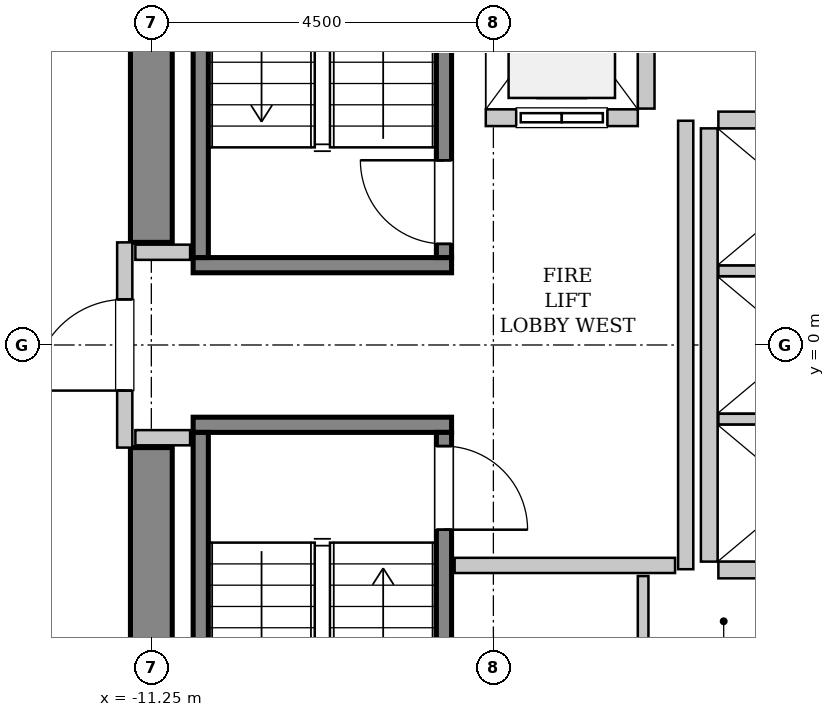
"""IFC4 building model, lengths in metres.
Left out: names, types, materials, properties, quantities, classifications, styles, units other than length and angle.
Written with IfcOpenShell. Run it as: python <this file> out.ifc"""

import sys

from ifc_helpers import new_model, si_unit, direction, frame, frame_2d, origin, place, context, subcontext, project, spatial, rectangle, extrude, source, transform, mapped, element, fill, save


model = new_model("IFC4")
c1 = context("Model", 3, precision=1e-05, world=origin(), true_north=direction((0.0, 1.0)))
c2 = subcontext(c1, "Body", "Model", "MODEL_VIEW")
j1 = project(units=[si_unit("LENGTHUNIT", "METRE"), si_unit("PLANEANGLEUNIT", "RADIAN")], contexts=[c1])
p1 = place(None, origin())
s1 = spatial("IfcSite", under=j1, at=p1, CompositionType="ELEMENT")
p2 = place(p1, origin())
s2 = spatial("IfcBuilding", under=s1, at=p2, CompositionType="ELEMENT")
p3 = place(p2, frame((0.0, 0.0, 164.0)))
s3 = spatial("IfcBuildingStorey", under=s2, at=p3, CompositionType="ELEMENT", Elevation=164.0)
m1 = source(origin(), c2, "Body", "SweptSolid", [
    extrude(rectangle(XDim=7.375, YDim=0.55, at=frame_2d((3.688, 0.0))), origin(), (0.0, 0.0, 1.0), 3.8),
])
for number, where, z_axis, x_axis in (
    (1, (-11.25, -8.725, 0.0), (0.0, 0.0, 1.0), (0.0, 1.0, 0.0)),
    (2, (-11.25, 1.35, 0.0), (0.0, 0.0, 1.0), (0.0, 1.0, 0.0)),
):
    element("IfcWall", number, at=place(p3, frame(where, z_axis=z_axis, x_axis=x_axis)), inside=s3, PredefinedType="SHEAR", context=c2, shape_type="MappedRepresentation", body=[
        mapped(m1, transform((0.0, 0.0, 0.0), x_axis=(1.0, 0.0, 0.0), y_axis=(0.0, 1.0, 0.0), z_axis=(0.0, 0.0, 1.0), scale=1.0)),
    ])
m2 = source(origin(), c2, "Body", "SweptSolid", [
    extrude(rectangle(XDim=3.4, YDim=0.2, at=frame_2d((1.7, 0.0))), origin(), (0.0, 0.0, 1.0), 3.8),
])
p4 = place(p3, frame((-7.3, 1.05, 0.0), z_axis=(0.0, 0.0, 1.0), x_axis=(-1.0, 0.0, 0.0)))
e3 = element("IfcWall", 3, at=p4, inside=s3, PredefinedType="SOLIDWALL", context=c2, shape_type="MappedRepresentation", body=[
    mapped(m2, transform((0.0, 0.0, 0.0), x_axis=(1.0, 0.0, 0.0), y_axis=(0.0, 1.0, 0.0), z_axis=(0.0, 0.0, 1.0), scale=1.0)),
])
m3 = source(origin(), c2, "Body", "SweptSolid", [
    extrude(rectangle(XDim=7.1, YDim=0.2, at=frame_2d((3.55, 0.0))), origin(), (0.0, 0.0, 1.0), 3.8),
])
p5 = place(p3, frame((-7.4, 1.15, 0.0), z_axis=(0.0, 0.0, 1.0), x_axis=(0.0, 1.0, 0.0)))
e4 = element("IfcWall", 4, at=p5, inside=s3, PredefinedType="SOLIDWALL", context=c2, shape_type="MappedRepresentation", body=[
    mapped(m3, transform((0.0, 0.0, 0.0), x_axis=(1.0, 0.0, 0.0), y_axis=(0.0, 1.0, 0.0), z_axis=(0.0, 0.0, 1.0), scale=1.0)),
])
p6 = place(p5, frame((0.18, 0.0, 0.0)))
e5 = element("IfcOpeningElement", 5, at=p6, cuts=e4, PredefinedType="OPENING", context=c2, shape_type="SweptSolid", body=[
    extrude(rectangle(XDim=1.1, YDim=2.15, at=frame_2d((0.55, 1.075))), frame((0.0, 0.11, 0.0), z_axis=(0.0, -1.0, 0.0), x_axis=(1.0, 0.0, 0.0)), (0.0, 0.0, 1.0), 0.22),
])
p7 = place(p3, frame((-10.6, 1.15, 0.0), z_axis=(0.0, 0.0, 1.0), x_axis=(0.0, 1.0, 0.0)))
e6 = element("IfcWall", 6, at=p7, inside=s3, PredefinedType="SOLIDWALL", context=c2, shape_type="MappedRepresentation", body=[
    mapped(m3, transform((0.0, 0.0, 0.0), x_axis=(1.0, 0.0, 0.0), y_axis=(0.0, 1.0, 0.0), z_axis=(0.0, 0.0, 1.0), scale=1.0)),
])
p8 = place(p3, frame((-10.7, -1.05, 0.0), z_axis=(0.0, 0.0, 1.0), x_axis=(1.0, 0.0, 0.0)))
e7 = element("IfcWall", 7, at=p8, inside=s3, PredefinedType="SOLIDWALL", context=c2, shape_type="MappedRepresentation", body=[
    mapped(m2, transform((0.0, 0.0, 0.0), x_axis=(1.0, 0.0, 0.0), y_axis=(0.0, 1.0, 0.0), z_axis=(0.0, 0.0, 1.0), scale=1.0)),
])
p9 = place(p3, frame((-10.6, -1.15, 0.0), z_axis=(0.0, 0.0, 1.0), x_axis=(0.0, -1.0, 0.0)))
e8 = element("IfcWall", 8, at=p9, inside=s3, PredefinedType="SOLIDWALL", context=c2, shape_type="MappedRepresentation", body=[
    mapped(m3, transform((0.0, 0.0, 0.0), x_axis=(1.0, 0.0, 0.0), y_axis=(0.0, 1.0, 0.0), z_axis=(0.0, 0.0, 1.0), scale=1.0)),
])
p10 = place(p3, frame((-7.4, -1.15, 0.0), z_axis=(0.0, 0.0, 1.0), x_axis=(0.0, -1.0, 0.0)))
e9 = element("IfcWall", 9, at=p10, inside=s3, PredefinedType="SOLIDWALL", context=c2, shape_type="MappedRepresentation", body=[
    mapped(m3, transform((0.0, 0.0, 0.0), x_axis=(1.0, 0.0, 0.0), y_axis=(0.0, 1.0, 0.0), z_axis=(0.0, 0.0, 1.0), scale=1.0)),
])
p11 = place(p10, frame((0.18, 0.0, 0.0)))
e10 = element("IfcOpeningElement", 10, at=p11, cuts=e9, PredefinedType="OPENING", context=c2, shape_type="SweptSolid", body=[
    extrude(rectangle(XDim=1.1, YDim=2.15, at=frame_2d((0.55, 1.075))), frame((0.0, 0.11, 0.0), z_axis=(0.0, -1.0, 0.0), x_axis=(1.0, 0.0, 0.0)), (0.0, 0.0, 1.0), 0.22),
])
m4 = source(origin(), c2, "Body", "SweptSolid", [
    extrude(rectangle(XDim=2.0, YDim=0.22, at=frame_2d((1.0, 0.0))), origin(), (0.0, 0.0, 1.0), 3.535),
])
p12 = place(p3, frame((-6.85, 2.99, 0.0), z_axis=(0.0, 0.0, 1.0), x_axis=(1.0, 0.0, 0.0)))
e11 = element("IfcWall", 11, at=p12, inside=s3, PredefinedType="SOLIDWALL", context=c2, shape_type="MappedRepresentation", body=[
    mapped(m4, transform((0.0, 0.0, 0.0), x_axis=(1.0, 0.0, 0.0), y_axis=(0.0, 1.0, 0.0), z_axis=(0.0, 0.0, 1.0), scale=1.0)),
])
p13 = place(p12, frame((0.4, 0.0, 0.0)))
e12 = element("IfcOpeningElement", 12, at=p13, cuts=e11, PredefinedType="OPENING", context=c2, shape_type="SweptSolid", body=[
    extrude(rectangle(XDim=1.2, YDim=2.2, at=frame_2d((0.6, 1.1))), frame((0.0, 0.12, 0.0), z_axis=(0.0, -1.0, 0.0), x_axis=(1.0, 0.0, 0.0)), (0.0, 0.0, 1.0), 0.24),
])
m5 = source(origin(), c2, "Body", "SweptSolid", [
    extrude(rectangle(XDim=2.68, YDim=0.22, at=frame_2d((1.34, 0.0))), origin(), (0.0, 0.0, 1.0), 3.535),
])
p14 = place(p3, frame((-4.74, 3.11, 0.0), z_axis=(0.0, 0.0, 1.0), x_axis=(0.0, 1.0, 0.0)))
e13 = element("IfcWall", 13, at=p14, inside=s3, PredefinedType="SOLIDWALL", context=c2, shape_type="MappedRepresentation", body=[
    mapped(m5, transform((0.0, 0.0, 0.0), x_axis=(1.0, 0.0, 0.0), y_axis=(0.0, 1.0, 0.0), z_axis=(0.0, 0.0, 1.0), scale=1.0)),
])
m6 = source(origin(), c2, "Body", "SweptSolid", [
    extrude(rectangle(XDim=5.7, YDim=0.22, at=frame_2d((2.85, 0.0))), origin(), (0.0, 0.0, 1.0), 3.535),
])
p15 = place(p3, frame((-3.91, 2.85, 0.0), z_axis=(0.0, 0.0, 1.0), x_axis=(0.0, -1.0, 0.0)))
e14 = element("IfcWall", 14, at=p15, inside=s3, PredefinedType="SOLIDWALL", context=c2, shape_type="MappedRepresentation", body=[
    mapped(m6, transform((0.0, 0.0, 0.0), x_axis=(1.0, 0.0, 0.0), y_axis=(0.0, 1.0, 0.0), z_axis=(0.0, 0.0, 1.0), scale=1.0)),
])
m7 = source(origin(), c2, "Body", "SweptSolid", [
    extrude(rectangle(XDim=2.13, YDim=0.22, at=frame_2d((1.065, 0.0))), origin(), (0.0, 0.0, 1.0), 3.535),
])
p16 = place(p3, frame((-3.79, -2.96, 0.0), z_axis=(0.0, 0.0, 1.0), x_axis=(1.0, 0.0, 0.0)))
e15 = element("IfcWall", 15, at=p16, inside=s3, PredefinedType="SOLIDWALL", context=c2, shape_type="MappedRepresentation", body=[
    mapped(m7, transform((0.0, 0.0, 0.0), x_axis=(1.0, 0.0, 0.0), y_axis=(0.0, 1.0, 0.0), z_axis=(0.0, 0.0, 1.0), scale=1.0)),
])
m8 = source(origin(), c2, "Body", "SweptSolid", [
    extrude(rectangle(XDim=2.13, YDim=0.14, at=frame_2d((1.065, 0.0))), origin(), (0.0, 0.0, 1.0), 3.535),
])
for number, where, z_axis, x_axis in (
    (16, (-3.79, -0.975, 0.0), (0.0, 0.0, 1.0), (1.0, 0.0, 0.0)),
    (17, (-3.79, 0.975, 0.0), (0.0, 0.0, 1.0), (1.0, 0.0, 0.0)),
):
    element("IfcWall", number, at=place(p3, frame(where, z_axis=z_axis, x_axis=x_axis)), inside=s3, PredefinedType="PARTITIONING", context=c2, shape_type="MappedRepresentation", body=[
        mapped(m8, transform((0.0, 0.0, 0.0), x_axis=(1.0, 0.0, 0.0), y_axis=(0.0, 1.0, 0.0), z_axis=(0.0, 0.0, 1.0), scale=1.0)),
    ])
p17 = place(p3, frame((-1.66, 2.96, 0.0), z_axis=(0.0, 0.0, 1.0), x_axis=(-1.0, 0.0, 0.0)))
e18 = element("IfcWall", 18, at=p17, inside=s3, PredefinedType="SOLIDWALL", context=c2, shape_type="MappedRepresentation", body=[
    mapped(m7, transform((0.0, 0.0, 0.0), x_axis=(1.0, 0.0, 0.0), y_axis=(0.0, 1.0, 0.0), z_axis=(0.0, 0.0, 1.0), scale=1.0)),
])
m9 = source(origin(), c2, "Body", "SweptSolid", [
    extrude(rectangle(XDim=2.7, YDim=0.2, at=frame_2d((1.35, 0.0))), origin(), (0.0, 0.0, 1.0), 2.425),
])
p18 = place(p3, frame((-11.6, -1.35, 0.0), z_axis=(0.0, 0.0, 1.0), x_axis=(0.0, 1.0, 0.0)))
e19 = element("IfcWall", 19, at=p18, inside=s3, PredefinedType="PARTITIONING", context=c2, shape_type="MappedRepresentation", body=[
    mapped(m9, transform((0.0, 0.0, 0.0), x_axis=(1.0, 0.0, 0.0), y_axis=(0.0, 1.0, 0.0), z_axis=(0.0, 0.0, 1.0), scale=1.0)),
])
p19 = place(p18, frame((0.75, 0.0, 0.0)))
e20 = element("IfcOpeningElement", 20, at=p19, cuts=e19, PredefinedType="OPENING", context=c2, shape_type="SweptSolid", body=[
    extrude(rectangle(XDim=1.2, YDim=2.15, at=frame_2d((0.6, 1.075))), frame((0.0, 0.11, 0.0), z_axis=(0.0, -1.0, 0.0), x_axis=(1.0, 0.0, 0.0)), (0.0, 0.0, 1.0), 0.22),
])
m10 = source(origin(), c2, "Body", "SweptSolid", [
    extrude(rectangle(XDim=5.9, YDim=0.2, at=frame_2d((2.95, 0.0))), origin(), (0.0, 0.0, 1.0), 3.535),
])
p20 = place(p3, frame((-4.22, -2.95, 0.0), z_axis=(0.0, 0.0, 1.0), x_axis=(0.0, 1.0, 0.0)))
e21 = element("IfcWall", 21, at=p20, inside=s3, PredefinedType="PARTITIONING", context=c2, shape_type="MappedRepresentation", body=[
    mapped(m10, transform((0.0, 0.0, 0.0), x_axis=(1.0, 0.0, 0.0), y_axis=(0.0, 1.0, 0.0), z_axis=(0.0, 0.0, 1.0), scale=1.0)),
])
m11 = source(origin(), c2, "Body", "SweptSolid", [
    extrude(rectangle(XDim=2.9, YDim=0.2, at=frame_2d((1.45, 0.0))), origin(), (0.0, 0.0, 1.0), 3.535),
])
p21 = place(p3, frame((-7.26, -2.9, 0.0), z_axis=(0.0, 0.0, 1.0), x_axis=(1.0, 0.0, 0.0)))
e22 = element("IfcWall", 22, at=p21, inside=s3, PredefinedType="PARTITIONING", context=c2, shape_type="MappedRepresentation", body=[
    mapped(m11, transform((0.0, 0.0, 0.0), x_axis=(1.0, 0.0, 0.0), y_axis=(0.0, 1.0, 0.0), z_axis=(0.0, 0.0, 1.0), scale=1.0)),
])
m12 = source(origin(), c2, "Body", "SweptSolid", [
    extrude(rectangle(XDim=0.72, YDim=0.2, at=frame_2d((0.36, 0.0))), origin(), (0.0, 0.0, 1.0), 3.535),
])
for number, where, z_axis, x_axis in (
    (23, (-11.46, 1.22, 0.0), (0.0, 0.0, 1.0), (1.0, 0.0, 0.0)),
    (24, (-11.46, -1.22, 0.0), (0.0, 0.0, 1.0), (1.0, 0.0, 0.0)),
):
    element("IfcWall", number, at=place(p3, frame(where, z_axis=z_axis, x_axis=x_axis)), inside=s3, PredefinedType="PARTITIONING", context=c2, shape_type="MappedRepresentation", body=[
        mapped(m12, transform((0.0, 0.0, 0.0), x_axis=(1.0, 0.0, 0.0), y_axis=(0.0, 1.0, 0.0), z_axis=(0.0, 0.0, 1.0), scale=1.0)),
    ])
m13 = source(origin(), c2, "Body", "SweptSolid", [
    extrude(rectangle(XDim=1.1, YDim=0.14, at=frame_2d((0.55, 0.0))), origin(), (0.0, 0.0, 1.0), 3.535),
])
p22 = place(p3, frame((-4.78, -4.14, 0.0), z_axis=(0.0, 0.0, 1.0), x_axis=(0.0, 1.0, 0.0)))
e25 = element("IfcWall", 25, at=p22, inside=s3, PredefinedType="PARTITIONING", context=c2, shape_type="MappedRepresentation", body=[
    mapped(m13, transform((0.0, 0.0, 0.0), x_axis=(1.0, 0.0, 0.0), y_axis=(0.0, 1.0, 0.0), z_axis=(0.0, 0.0, 1.0), scale=1.0)),
])
m14 = source(origin(), c2, "Body", "SweptSolid", [
    extrude(rectangle(XDim=1.1, YDim=2.15, at=frame_2d((0.55, 1.075))), frame((0.0, 0.025, 0.0), z_axis=(0.0, -1.0, 0.0), x_axis=(1.0, 0.0, 0.0)), (0.0, 0.0, 1.0), 0.05),
])
p23 = place(p6, origin())
e26 = element("IfcDoor", 26, at=p23, inside=s3, OperationType="SINGLE_SWING_RIGHT", PredefinedType="DOOR", context=c2, shape_type="MappedRepresentation", body=[
    mapped(m14, transform((0.0, 0.0, 0.0), x_axis=(1.0, 0.0, 0.0), y_axis=(0.0, 1.0, 0.0), z_axis=(0.0, 0.0, 1.0), scale=1.0)),
])
fill(e5, e26)
p24 = place(p11, origin())
e27 = element("IfcDoor", 27, at=p24, inside=s3, OperationType="SINGLE_SWING_RIGHT", PredefinedType="DOOR", context=c2, shape_type="MappedRepresentation", body=[
    mapped(m14, transform((0.0, 0.0, 0.0), x_axis=(1.0, 0.0, 0.0), y_axis=(0.0, 1.0, 0.0), z_axis=(0.0, 0.0, 1.0), scale=1.0)),
])
fill(e10, e27)
m15 = source(origin(), c2, "Body", "SweptSolid", [
    extrude(rectangle(XDim=1.2, YDim=2.2, at=frame_2d((0.6, 1.1))), frame((0.0, 0.025, 0.0), z_axis=(0.0, -1.0, 0.0), x_axis=(1.0, 0.0, 0.0)), (0.0, 0.0, 1.0), 0.05),
])
p25 = place(p13, origin())
e28 = element("IfcDoor", 28, at=p25, inside=s3, OperationType="SLIDING_TO_LEFT", PredefinedType="DOOR", context=c2, shape_type="MappedRepresentation", body=[
    mapped(m15, transform((0.0, 0.0, 0.0), x_axis=(1.0, 0.0, 0.0), y_axis=(0.0, 1.0, 0.0), z_axis=(0.0, 0.0, 1.0), scale=1.0)),
])
fill(e12, e28)
m16 = source(origin(), c2, "Body", "SweptSolid", [
    extrude(rectangle(XDim=1.2, YDim=2.15, at=frame_2d((0.6, 1.075))), frame((0.0, 0.025, 0.0), z_axis=(0.0, -1.0, 0.0), x_axis=(1.0, 0.0, 0.0)), (0.0, 0.0, 1.0), 0.05),
])
p26 = place(p19, origin())
e29 = element("IfcDoor", 29, at=p26, inside=s3, OperationType="SINGLE_SWING_LEFT", PredefinedType="DOOR", context=c2, shape_type="MappedRepresentation", body=[
    mapped(m16, transform((0.0, 0.0, 0.0), x_axis=(1.0, 0.0, 0.0), y_axis=(0.0, 1.0, 0.0), z_axis=(0.0, 0.0, 1.0), scale=1.0)),
])
fill(e20, e29)
save(model, sys.argv[1])
